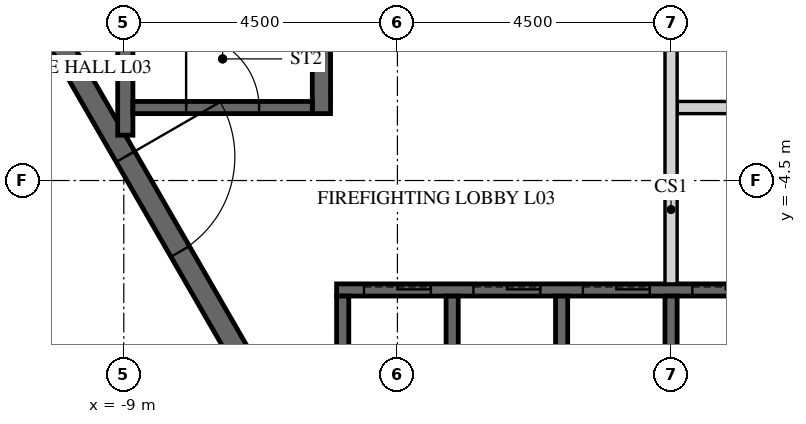
"""IFC4 building model, lengths in metres.
Left out: names, types, materials, properties, quantities, classifications, styles, units other than length and angle.
Written with IfcOpenShell. Run it as: python <this file> out.ifc"""

import sys

from ifc_helpers import new_model, si_unit, direction, frame, frame_2d, origin, place, context, subcontext, project, spatial, polyline, rectangle, outline, extrude, element, fill, save


model = new_model("IFC4")
c1 = context("Model", 3, precision=1e-05, world=origin(), true_north=direction((0.0, 1.0)))
c2 = subcontext(c1, "Body", "Model", "MODEL_VIEW")
j1 = project(units=[si_unit("LENGTHUNIT", "METRE"), si_unit("PLANEANGLEUNIT", "RADIAN")], contexts=[c1])
p1 = place(None, origin())
s1 = spatial("IfcSite", under=j1, at=p1, CompositionType="ELEMENT")
p2 = place(p1, origin())
s2 = spatial("IfcBuilding", under=s1, at=p2, CompositionType="ELEMENT")
p3 = place(p2, frame((0.0, 0.0, 20.5)))
s3 = spatial("IfcBuildingStorey", under=s2, at=p3, CompositionType="ELEMENT", Elevation=20.5)
p4 = place(p3, frame((-15.819, 0.0, -0.25), z_axis=(0.0, 0.0, 1.0), x_axis=(0.499999880136, -0.866025472988, 0.0)))
e1 = element("IfcWall", 1, at=p4, inside=s3, PredefinedType="SHEAR", context=c2, shape_type="SweptSolid", body=[
    extrude(outline(polyline([(-0.173, -0.3), (15.993, -0.3), (15.646, 0.3), (0.173, 0.3), (-0.173, -0.3)])), origin(), (0.0, 0.0, 1.0), 5.5),
])
p5 = place(p4, frame((6.981, 0.0, 0.25)))
e2 = element("IfcOpeningElement", 2, at=p5, cuts=e1, PredefinedType="OPENING", context=c2, shape_type="SweptSolid", body=[
    extrude(rectangle(XDim=1.8, YDim=2.4, at=frame_2d((0.9, 1.2))), frame((0.0, 0.31, 0.0), z_axis=(0.0, -1.0, 0.0), x_axis=(1.0, 0.0, 0.0)), (0.0, 0.0, 1.0), 0.62),
])
p6 = place(p3, frame((-11.345, 0.0, -0.25), z_axis=(0.0, 0.0, 1.0), x_axis=(0.499995046907, -0.866028263435, 0.0)))
e3 = element("IfcWall", 3, at=p6, inside=s3, PredefinedType="SHEAR", context=c2, shape_type="SweptSolid", body=[
    extrude(outline(polyline([(-0.101, -0.175), (11.446, -0.175), (11.244, 0.175), (0.101, 0.175), (-0.101, -0.175)])), origin(), (0.0, 0.0, 1.0), 5.5),
])
p7 = place(p6, frame((4.744, 0.0, 0.25)))
e4 = element("IfcOpeningElement", 4, at=p7, cuts=e3, PredefinedType="OPENING", context=c2, shape_type="SweptSolid", body=[
    extrude(rectangle(XDim=1.8, YDim=2.4, at=frame_2d((0.9, 1.2))), frame((0.0, 0.185, 0.0), z_axis=(0.0, -1.0, 0.0), x_axis=(1.0, 0.0, 0.0)), (0.0, 0.0, 1.0), 0.37),
])
p8 = place(p3, frame((-5.5, -6.3, -0.25), z_axis=(0.0, 0.0, 1.0), x_axis=(1.0, 0.0, 0.0)))
e5 = element("IfcWall", 5, at=p8, inside=s3, PredefinedType="SHEAR", context=c2, shape_type="SweptSolid", body=[
    extrude(rectangle(XDim=9.2, YDim=0.2, at=frame_2d((4.6, 0.0))), origin(), (0.0, 0.0, 1.0), 5.5),
])
p9 = place(p8, frame((0.45, 0.0, 0.25)))
e6 = element("IfcOpeningElement", 6, at=p9, cuts=e5, PredefinedType="OPENING", context=c2, shape_type="SweptSolid", body=[
    extrude(rectangle(XDim=1.1, YDim=2.1, at=frame_2d((0.55, 1.05))), frame((0.0, 0.11, 0.0), z_axis=(0.0, -1.0, 0.0), x_axis=(1.0, 0.0, 0.0)), (0.0, 0.0, 1.0), 0.22),
])
p10 = place(p8, frame((2.25, 0.0, 0.25)))
e7 = element("IfcOpeningElement", 7, at=p10, cuts=e5, PredefinedType="OPENING", context=c2, shape_type="SweptSolid", body=[
    extrude(rectangle(XDim=1.1, YDim=2.1, at=frame_2d((0.55, 1.05))), frame((0.0, 0.11, 0.0), z_axis=(0.0, -1.0, 0.0), x_axis=(1.0, 0.0, 0.0)), (0.0, 0.0, 1.0), 0.22),
])
p11 = place(p8, frame((4.05, 0.0, 0.25)))
e8 = element("IfcOpeningElement", 8, at=p11, cuts=e5, PredefinedType="OPENING", context=c2, shape_type="SweptSolid", body=[
    extrude(rectangle(XDim=1.1, YDim=2.1, at=frame_2d((0.55, 1.05))), frame((0.0, 0.11, 0.0), z_axis=(0.0, -1.0, 0.0), x_axis=(1.0, 0.0, 0.0)), (0.0, 0.0, 1.0), 0.22),
])
p12 = place(p8, frame((5.85, 0.0, 0.25)))
e9 = element("IfcOpeningElement", 9, at=p12, cuts=e5, PredefinedType="OPENING", context=c2, shape_type="SweptSolid", body=[
    extrude(rectangle(XDim=1.1, YDim=2.1, at=frame_2d((0.55, 1.05))), frame((0.0, 0.11, 0.0), z_axis=(0.0, -1.0, 0.0), x_axis=(1.0, 0.0, 0.0)), (0.0, 0.0, 1.0), 0.22),
])
p13 = place(p8, frame((7.65, 0.0, 0.25)))
e10 = element("IfcOpeningElement", 10, at=p13, cuts=e5, PredefinedType="OPENING", context=c2, shape_type="SweptSolid", body=[
    extrude(rectangle(XDim=1.1, YDim=2.1, at=frame_2d((0.55, 1.05))), frame((0.0, 0.11, 0.0), z_axis=(0.0, -1.0, 0.0), x_axis=(1.0, 0.0, 0.0)), (0.0, 0.0, 1.0), 0.22),
])
for number, where, z_axis, x_axis in (
    (11, (-5.4, -9.3, -0.25), (0.0, 0.0, 1.0), (0.0, 1.0, 0.0)),
    (12, (-3.6, -9.3, -0.25), (0.0, 0.0, 1.0), (0.0, 1.0, 0.0)),
    (13, (-1.8, -9.3, -0.25), (0.0, 0.0, 1.0), (0.0, 1.0, 0.0)),
    (14, (0.0, -9.3, -0.25), (0.0, 0.0, 1.0), (0.0, 1.0, 0.0)),
):
    element("IfcWall", number, at=place(p3, frame(where, z_axis=z_axis, x_axis=x_axis)), inside=s3, PredefinedType="SHEAR", context=c2, shape_type="SweptSolid", body=[
        extrude(rectangle(XDim=2.9, YDim=0.2, at=frame_2d((1.45, 0.0))), origin(), (0.0, 0.0, 1.0), 5.5),
    ])
p14 = place(p3, frame((0.1, -3.3, 0.0), z_axis=(0.0, 0.0, 1.0), x_axis=(1.0, 0.0, 0.0)))
e15 = element("IfcWall", 15, at=p14, inside=s3, PredefinedType="PARTITIONING", context=c2, shape_type="SweptSolid", body=[
    extrude(rectangle(XDim=5.5, YDim=0.2, at=frame_2d((2.75, 0.0))), origin(), (0.0, 0.0, 1.0), 5.25),
])
p15 = place(p14, frame((2.3, 0.0, 0.0)))
e16 = element("IfcOpeningElement", 16, at=p15, cuts=e15, PredefinedType="OPENING", context=c2, shape_type="SweptSolid", body=[
    extrude(rectangle(XDim=0.9, YDim=2.1, at=frame_2d((0.45, 1.05))), frame((0.0, 0.11, 0.0), z_axis=(0.0, -1.0, 0.0), x_axis=(1.0, 0.0, 0.0)), (0.0, 0.0, 1.0), 0.22),
])
p16 = place(p3, frame((0.0, -6.2, 0.0), z_axis=(0.0, 0.0, 1.0), x_axis=(0.0, 1.0, 0.0)))
e17 = element("IfcWall", 17, at=p16, inside=s3, PredefinedType="PARTITIONING", context=c2, shape_type="SweptSolid", body=[
    extrude(rectangle(XDim=6.1, YDim=0.2, at=frame_2d((3.05, 0.0))), origin(), (0.0, 0.0, 1.0), 5.25),
])
p17 = place(p3, frame((-5.75, -3.4, -0.25), z_axis=(0.0, 0.0, 1.0), x_axis=(0.0, 1.0, 0.0)))
e18 = element("IfcWall", 18, at=p17, inside=s3, PredefinedType="SHEAR", context=c2, shape_type="SweptSolid", body=[
    extrude(rectangle(XDim=6.8, YDim=0.3, at=frame_2d((3.4, 0.0))), origin(), (0.0, 0.0, 1.0), 5.5),
])
p18 = place(p3, frame((-8.975, -3.755, -0.25), z_axis=(0.0, 0.0, 1.0), x_axis=(0.0, 1.0, 0.0)))
e19 = element("IfcWall", 19, at=p18, inside=s3, PredefinedType="SHEAR", context=c2, shape_type="SweptSolid", body=[
    extrude(rectangle(XDim=7.51, YDim=0.25, at=frame_2d((3.755, 0.0))), origin(), (0.0, 0.0, 1.0), 5.5),
])
p19 = place(p3, frame((-8.85, -3.3, -0.25), z_axis=(0.0, 0.0, 1.0), x_axis=(1.0, 0.0, 0.0)))
e20 = element("IfcWall", 20, at=p19, inside=s3, PredefinedType="SHEAR", context=c2, shape_type="SweptSolid", body=[
    extrude(rectangle(XDim=2.95, YDim=0.2, at=frame_2d((1.475, 0.0))), origin(), (0.0, 0.0, 1.0), 5.5),
])
p20 = place(p19, frame((0.875, 0.0, 0.25)))
e21 = element("IfcOpeningElement", 21, at=p20, cuts=e20, PredefinedType="OPENING", context=c2, shape_type="SweptSolid", body=[
    extrude(rectangle(XDim=1.2, YDim=2.4, at=frame_2d((0.6, 1.2))), frame((0.0, 0.11, 0.0), z_axis=(0.0, -1.0, 0.0), x_axis=(1.0, 0.0, 0.0)), (0.0, 0.0, 1.0), 0.22),
])
p21 = place(p7, origin())
e22 = element("IfcDoor", 22, at=p21, inside=s3, OperationType="DOUBLE_DOOR_SINGLE_SWING", PredefinedType="DOOR", context=c2, shape_type="SweptSolid", body=[
    extrude(rectangle(XDim=1.8, YDim=2.4, at=frame_2d((0.9, 1.2))), frame((0.0, 0.025, 0.0), z_axis=(0.0, -1.0, 0.0), x_axis=(1.0, 0.0, 0.0)), (0.0, 0.0, 1.0), 0.05),
])
fill(e4, e22)
p22 = place(p20, origin())
e23 = element("IfcDoor", 23, at=p22, inside=s3, OperationType="SINGLE_SWING_LEFT", PredefinedType="DOOR", context=c2, shape_type="SweptSolid", body=[
    extrude(rectangle(XDim=1.2, YDim=2.4, at=frame_2d((0.6, 1.2))), frame((0.0, 0.025, 0.0), z_axis=(0.0, -1.0, 0.0), x_axis=(1.0, 0.0, 0.0)), (0.0, 0.0, 1.0), 0.05),
])
fill(e21, e23)
p23 = place(p9, origin())
e24 = element("IfcDoor", 24, at=p23, inside=s3, OperationType="SLIDING_TO_LEFT", PredefinedType="DOOR", context=c2, shape_type="SweptSolid", body=[
    extrude(rectangle(XDim=1.1, YDim=2.1, at=frame_2d((0.55, 1.05))), frame((0.0, 0.025, 0.0), z_axis=(0.0, -1.0, 0.0), x_axis=(1.0, 0.0, 0.0)), (0.0, 0.0, 1.0), 0.05),
])
fill(e6, e24)
p24 = place(p10, origin())
e25 = element("IfcDoor", 25, at=p24, inside=s3, OperationType="SLIDING_TO_LEFT", PredefinedType="DOOR", context=c2, shape_type="SweptSolid", body=[
    extrude(rectangle(XDim=1.1, YDim=2.1, at=frame_2d((0.55, 1.05))), frame((0.0, 0.025, 0.0), z_axis=(0.0, -1.0, 0.0), x_axis=(1.0, 0.0, 0.0)), (0.0, 0.0, 1.0), 0.05),
])
fill(e7, e25)
p25 = place(p11, origin())
e26 = element("IfcDoor", 26, at=p25, inside=s3, OperationType="SLIDING_TO_LEFT", PredefinedType="DOOR", context=c2, shape_type="SweptSolid", body=[
    extrude(rectangle(XDim=1.1, YDim=2.1, at=frame_2d((0.55, 1.05))), frame((0.0, 0.025, 0.0), z_axis=(0.0, -1.0, 0.0), x_axis=(1.0, 0.0, 0.0)), (0.0, 0.0, 1.0), 0.05),
])
fill(e8, e26)
p26 = place(p12, origin())
e27 = element("IfcDoor", 27, at=p26, inside=s3, OperationType="SLIDING_TO_LEFT", PredefinedType="DOOR", context=c2, shape_type="SweptSolid", body=[
    extrude(rectangle(XDim=1.1, YDim=2.1, at=frame_2d((0.55, 1.05))), frame((0.0, 0.025, 0.0), z_axis=(0.0, -1.0, 0.0), x_axis=(1.0, 0.0, 0.0)), (0.0, 0.0, 1.0), 0.05),
])
fill(e9, e27)
save(model, sys.argv[1])
